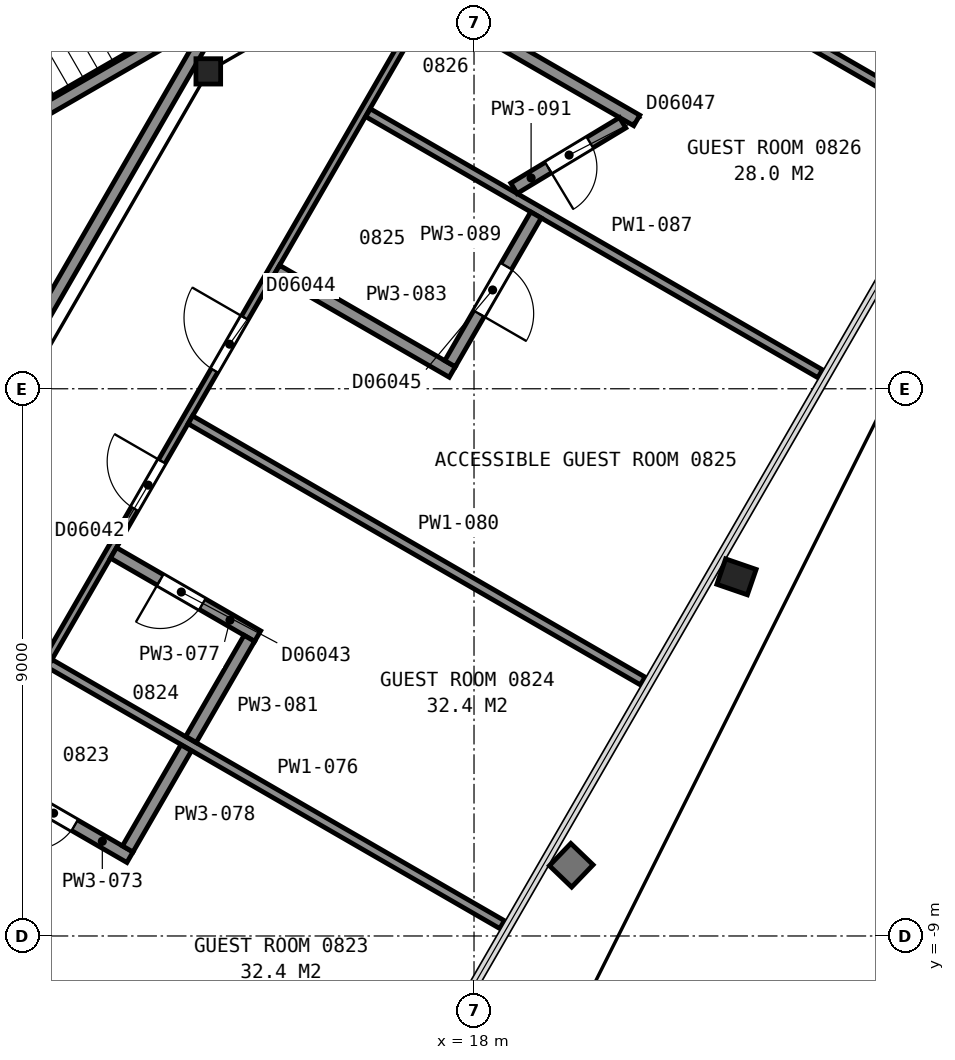
"""IFC4 building model, lengths in metres.
Left out: names, types, materials, properties, quantities, classifications, styles, units other than length and angle.
Written with IfcOpenShell. Run it as: python <this file> out.ifc"""

import sys

from ifc_helpers import new_model, si_unit, direction, frame, frame_2d, origin, origin_2d, place, context, subcontext, project, spatial, rectangle, i_section, extrude, element, fill, save


model = new_model("IFC4")
c1 = context("Model", 3, precision=1e-05, world=origin(), true_north=direction((0.0, 1.0)))
c2 = subcontext(c1, "Body", "Model", "MODEL_VIEW")
j1 = project(units=[si_unit("LENGTHUNIT", "METRE"), si_unit("PLANEANGLEUNIT", "RADIAN")], contexts=[c1])
p1 = place(None, origin())
s1 = spatial("IfcSite", under=j1, at=p1, CompositionType="ELEMENT")
p2 = place(p1, origin())
s2 = spatial("IfcBuilding", under=s1, at=p2, CompositionType="ELEMENT")
p3 = place(p2, frame((0.0, 0.0, 44.0)))
s3 = spatial("IfcBuildingStorey", under=s2, at=p3, CompositionType="ELEMENT", Elevation=44.0)
p4 = place(p3, frame((22.222, -3.061, 0.025), z_axis=(0.080308514275, -0.02761461711, 0.996387462515), x_axis=(-0.499182208178, -0.866345153128, 0.016223399441)))
e1 = element("IfcColumn", 1, at=p4, inside=s3, PredefinedType="COLUMN", context=c2, shape_type="SweptSolid", body=[
    extrude(i_section(OverallWidth=0.442, OverallDepth=0.531, WebThickness=0.066, FlangeThickness=0.106, FilletRadius=0.015, at=origin_2d()), origin(), (0.0, 0.0, 1.0), 3.563),
])
p5 = place(p3, frame((13.63, 5.22, 0.0), z_axis=(0.0, 0.0, 1.0), x_axis=(1.0, 0.0, 0.0)))
e2 = element("IfcColumn", 2, at=p5, inside=s3, PredefinedType="COLUMN", context=c2, shape_type="SweptSolid", body=[
    extrude(i_section(OverallWidth=0.406, OverallDepth=0.417, WebThickness=0.03, FlangeThickness=0.048, FilletRadius=0.015, at=origin_2d()), origin(), (0.0, 0.0, 1.0), 3.6),
])
for number, where, z_axis, x_axis in (
    (3, (6.178, 5.299, 0.0), (0.0, 0.0, 1.0), (0.866, 0.5, 0.0)),
    (4, (7.678, 2.701, 0.0), (0.0, 0.0, 1.0), (0.866, 0.5, 0.0)),
):
    element("IfcWall", number, at=place(p3, frame(where, z_axis=z_axis, x_axis=x_axis)), inside=s3, PredefinedType="PARTITIONING", context=c2, shape_type="SweptSolid", body=[
        extrude(rectangle(XDim=12.0, YDim=0.2, at=frame_2d((6.0, 0.0))), origin(), (0.0, 0.0, 1.0), 3.35),
    ])
p6 = place(p3, frame((8.492, -3.012, 0.0), z_axis=(0.0, 0.0, 1.0), x_axis=(0.499972957231, 0.866041016371, 0.0)))
e5 = element("IfcWall", 5, at=p6, inside=s3, PredefinedType="PARTITIONING", context=c2, shape_type="SweptSolid", body=[
    extrude(rectangle(XDim=10.349, YDim=0.2, at=frame_2d((5.174, 0.0))), origin(), (0.0, 0.0, 1.0), 3.35),
])
p7 = place(p3, frame((16.967, 5.906, 0.0), z_axis=(0.0, 0.0, 1.0), x_axis=(-0.500024758804, -0.866011108811, 0.0)))
e6 = element("IfcWall", 6, at=p7, inside=s3, PredefinedType="PARTITIONING", context=c2, shape_type="SweptSolid", body=[
    extrude(rectangle(XDim=26.402, YDim=0.125, at=frame_2d((13.201, 0.0))), origin(), (0.0, 0.0, 1.0), 2.613),
])
p8 = place(p7, frame((24.689, 0.0, 0.0)))
e7 = element("IfcOpeningElement", 7, at=p8, cuts=e6, PredefinedType="OPENING", context=c2, shape_type="SweptSolid", body=[
    extrude(rectangle(XDim=0.9, YDim=2.1, at=frame_2d((0.45, 1.05))), frame((0.0, 0.073, 0.0), z_axis=(0.0, -1.0, 0.0), x_axis=(1.0, 0.0, 0.0)), (0.0, 0.0, 1.0), 0.145),
])
p9 = place(p7, frame((17.709, 0.0, 0.0)))
e8 = element("IfcOpeningElement", 8, at=p9, cuts=e6, PredefinedType="OPENING", context=c2, shape_type="SweptSolid", body=[
    extrude(rectangle(XDim=0.9, YDim=2.1, at=frame_2d((0.45, 1.05))), frame((0.0, 0.073, 0.0), z_axis=(0.0, -1.0, 0.0), x_axis=(1.0, 0.0, 0.0)), (0.0, 0.0, 1.0), 0.145),
])
p10 = place(p7, frame((14.928, 0.0, 0.0)))
e9 = element("IfcOpeningElement", 9, at=p10, cuts=e6, PredefinedType="OPENING", context=c2, shape_type="SweptSolid", body=[
    extrude(rectangle(XDim=0.9, YDim=2.1, at=frame_2d((0.45, 1.05))), frame((0.0, 0.073, 0.0), z_axis=(0.0, -1.0, 0.0), x_axis=(1.0, 0.0, 0.0)), (0.0, 0.0, 1.0), 0.145),
])
p11 = place(p7, frame((8.2, 0.0, 0.0)))
e10 = element("IfcOpeningElement", 10, at=p11, cuts=e6, PredefinedType="OPENING", context=c2, shape_type="SweptSolid", body=[
    extrude(rectangle(XDim=0.9, YDim=2.1, at=frame_2d((0.45, 1.05))), frame((0.0, 0.073, 0.0), z_axis=(0.0, -1.0, 0.0), x_axis=(1.0, 0.0, 0.0)), (0.0, 0.0, 1.0), 0.145),
])
p12 = place(p7, frame((5.473, 0.0, 0.0)))
e11 = element("IfcOpeningElement", 11, at=p12, cuts=e6, PredefinedType="OPENING", context=c2, shape_type="SweptSolid", body=[
    extrude(rectangle(XDim=1.0, YDim=2.1, at=frame_2d((0.5, 1.05))), frame((0.0, 0.073, 0.0), z_axis=(0.0, -1.0, 0.0), x_axis=(1.0, 0.0, 0.0)), (0.0, 0.0, 1.0), 0.145),
])
p13 = place(p3, frame((8.707, -8.525, 0.0), z_axis=(0.0, 0.0, 1.0), x_axis=(0.866036528751, -0.499980730498, 0.0)))
e12 = element("IfcWall", 12, at=p13, inside=s3, PredefinedType="PARTITIONING", context=c2, shape_type="SweptSolid", body=[
    extrude(rectangle(XDim=8.592, YDim=0.15, at=frame_2d((4.296, 0.0))), origin(), (0.0, 0.0, 1.0), 2.613),
])
p14 = place(p3, frame((9.971, -6.336, 0.0), z_axis=(0.0, 0.0, 1.0), x_axis=(0.86596722502, -0.50010075504, 0.0)))
e13 = element("IfcWall", 13, at=p14, inside=s3, PredefinedType="PARTITIONING", context=c2, shape_type="SweptSolid", body=[
    extrude(rectangle(XDim=2.737, YDim=0.2, at=frame_2d((1.369, 0.0))), origin(), (0.0, 0.0, 1.0), 2.613),
])
p15 = place(p14, frame((0.887, 0.0, 0.0)))
e14 = element("IfcOpeningElement", 14, at=p15, cuts=e13, PredefinedType="OPENING", context=c2, shape_type="SweptSolid", body=[
    extrude(rectangle(XDim=0.8, YDim=2.1, at=frame_2d((0.4, 1.05))), frame((0.0, 0.11, 0.0), z_axis=(0.0, -1.0, 0.0), x_axis=(1.0, 0.0, 0.0)), (0.0, 0.0, 1.0), 0.22),
])
p16 = place(p3, frame((11.021, -4.517, 0.0), z_axis=(0.0, 0.0, 1.0), x_axis=(0.866029425019, -0.499993034952, 0.0)))
e15 = element("IfcWall", 15, at=p16, inside=s3, PredefinedType="PARTITIONING", context=c2, shape_type="SweptSolid", body=[
    extrude(rectangle(XDim=8.591, YDim=0.15, at=frame_2d((4.296, 0.0))), origin(), (0.0, 0.0, 1.0), 2.613),
])
p17 = place(p3, frame((14.442, -4.068, 0.0), z_axis=(0.0, 0.0, 1.0), x_axis=(-0.865989529477, 0.500062130976, 0.0)))
e16 = element("IfcWall", 16, at=p17, inside=s3, PredefinedType="PARTITIONING", context=c2, shape_type="SweptSolid", body=[
    extrude(rectangle(XDim=2.738, YDim=0.2, at=frame_2d((1.369, 0.0))), origin(), (0.0, 0.0, 1.0), 2.613),
])
p18 = place(p17, frame((1.05, 0.0, 0.0)))
e17 = element("IfcOpeningElement", 17, at=p18, cuts=e16, PredefinedType="OPENING", context=c2, shape_type="SweptSolid", body=[
    extrude(rectangle(XDim=0.8, YDim=2.1, at=frame_2d((0.4, 1.05))), frame((0.0, 0.11, 0.0), z_axis=(0.0, -1.0, 0.0), x_axis=(1.0, 0.0, 0.0)), (0.0, 0.0, 1.0), 0.22),
])
p19 = place(p3, frame((12.305, -7.568, 0.0), z_axis=(0.0, 0.0, 1.0), x_axis=(0.500269123289, 0.865869969617, 0.0)))
e18 = element("IfcWall", 18, at=p19, inside=s3, PredefinedType="PARTITIONING", context=c2, shape_type="SweptSolid", body=[
    extrude(rectangle(XDim=1.92, YDim=0.2, at=frame_2d((0.96, 0.0))), origin(), (0.0, 0.0, 1.0), 2.613),
])
p20 = place(p3, frame((13.335, -0.51, 0.0), z_axis=(0.0, 0.0, 1.0), x_axis=(0.865995804368, -0.50005126419, 0.0)))
e19 = element("IfcWall", 19, at=p20, inside=s3, PredefinedType="PARTITIONING", context=c2, shape_type="SweptSolid", body=[
    extrude(rectangle(XDim=8.591, YDim=0.15, at=frame_2d((4.295, 0.0))), origin(), (0.0, 0.0, 1.0), 2.613),
])
p21 = place(p3, frame((13.345, -5.767, 0.0), z_axis=(0.0, 0.0, 1.0), x_axis=(0.499832553123, 0.866122057702, 0.0)))
e20 = element("IfcWall", 20, at=p21, inside=s3, PredefinedType="PARTITIONING", context=c2, shape_type="SweptSolid", body=[
    extrude(rectangle(XDim=1.92, YDim=0.2, at=frame_2d((0.96, 0.0))), origin(), (0.0, 0.0, 1.0), 2.613),
])
p22 = place(p3, frame((14.752, 1.945, 0.0), z_axis=(0.0, 0.0, 1.0), x_axis=(0.866033317326, -0.499986293093, 0.0)))
e21 = element("IfcWall", 21, at=p22, inside=s3, PredefinedType="PARTITIONING", context=c2, shape_type="SweptSolid", body=[
    extrude(rectangle(XDim=3.337, YDim=0.2, at=frame_2d((1.669, 0.0))), origin(), (0.0, 0.0, 1.0), 2.613),
])
p23 = place(p3, frame((16.256, 4.54, 0.0), z_axis=(0.0, 0.0, 1.0), x_axis=(0.866031705461, -0.499989085017, 0.0)))
e22 = element("IfcWall", 22, at=p23, inside=s3, PredefinedType="PARTITIONING", context=c2, shape_type="SweptSolid", body=[
    extrude(rectangle(XDim=8.587, YDim=0.15, at=frame_2d((4.293, 0.0))), origin(), (0.0, 0.0, 1.0), 2.613),
])
p24 = place(p3, frame((17.606, 0.413, 0.0), z_axis=(0.0, 0.0, 1.0), x_axis=(0.500024172624, 0.866011447264, 0.0)))
e23 = element("IfcWall", 23, at=p24, inside=s3, PredefinedType="PARTITIONING", context=c2, shape_type="SweptSolid", body=[
    extrude(rectangle(XDim=2.825, YDim=0.2, at=frame_2d((1.413, 0.0))), origin(), (0.0, 0.0, 1.0), 2.613),
])
p25 = place(p24, frame((0.95, 0.0, 0.0)))
e24 = element("IfcOpeningElement", 24, at=p25, cuts=e23, PredefinedType="OPENING", context=c2, shape_type="SweptSolid", body=[
    extrude(rectangle(XDim=0.9, YDim=2.1, at=frame_2d((0.45, 1.05))), frame((0.0, 0.11, 0.0), z_axis=(0.0, -1.0, 0.0), x_axis=(1.0, 0.0, 0.0)), (0.0, 0.0, 1.0), 0.22),
])
p26 = place(p3, frame((17.673, 6.147, 0.0), z_axis=(0.0, 0.0, 1.0), x_axis=(0.866077754448, -0.499909315027, 0.0)))
e25 = element("IfcWall", 25, at=p26, inside=s3, PredefinedType="PARTITIONING", context=c2, shape_type="SweptSolid", body=[
    extrude(rectangle(XDim=3.469, YDim=0.2, at=frame_2d((1.734, 0.0))), origin(), (0.0, 0.0, 1.0), 2.613),
])
p27 = place(p3, frame((18.657, 3.297, 0.0), z_axis=(0.0, 0.0, 1.0), x_axis=(0.856262573572, 0.51654080681, 0.0)))
e26 = element("IfcWall", 26, at=p27, inside=s3, PredefinedType="PARTITIONING", context=c2, shape_type="SweptSolid", body=[
    extrude(rectangle(XDim=2.088, YDim=0.2, at=frame_2d((1.044, 0.0))), origin(), (0.0, 0.0, 1.0), 2.613),
])
p28 = place(p27, frame((0.659, 0.0, 0.0)))
e27 = element("IfcOpeningElement", 27, at=p28, cuts=e26, PredefinedType="OPENING", context=c2, shape_type="SweptSolid", body=[
    extrude(rectangle(XDim=0.8, YDim=2.1, at=frame_2d((0.4, 1.05))), frame((0.0, 0.11, 0.0), z_axis=(0.0, -1.0, 0.0), x_axis=(1.0, 0.0, 0.0)), (0.0, 0.0, 1.0), 0.22),
])
p29 = place(p3, frame((21.189, 7.036, 0.0), z_axis=(0.0, 0.0, 1.0), x_axis=(0.865981654797, -0.500075767815, 0.0)))
e28 = element("IfcWall", 28, at=p29, inside=s3, PredefinedType="PARTITIONING", context=c2, shape_type="SweptSolid", body=[
    extrude(rectangle(XDim=5.563, YDim=0.15, at=frame_2d((2.781, 0.0))), origin(), (0.0, 0.0, 1.0), 2.613),
])
p30 = place(p11, origin())
e29 = element("IfcDoor", 29, at=p30, inside=s3, OperationType="SINGLE_SWING_LEFT", PredefinedType="DOOR", context=c2, shape_type="SweptSolid", body=[
    extrude(rectangle(XDim=0.9, YDim=2.1, at=frame_2d((0.45, 1.05))), frame((0.0, 0.025, 0.0), z_axis=(0.0, -1.0, 0.0), x_axis=(1.0, 0.0, 0.0)), (0.0, 0.0, 1.0), 0.05),
])
fill(e10, e29)
p31 = place(p12, origin())
e30 = element("IfcDoor", 30, at=p31, inside=s3, OperationType="SINGLE_SWING_LEFT", PredefinedType="DOOR", context=c2, shape_type="SweptSolid", body=[
    extrude(rectangle(XDim=1.0, YDim=2.1, at=frame_2d((0.5, 1.05))), frame((0.0, 0.025, 0.0), z_axis=(0.0, -1.0, 0.0), x_axis=(1.0, 0.0, 0.0)), (0.0, 0.0, 1.0), 0.05),
])
fill(e11, e30)
p32 = place(p15, origin())
e31 = element("IfcDoor", 31, at=p32, inside=s3, OperationType="SINGLE_SWING_LEFT", PredefinedType="DOOR", context=c2, shape_type="SweptSolid", body=[
    extrude(rectangle(XDim=0.8, YDim=2.1, at=frame_2d((0.4, 1.05))), frame((0.0, 0.025, 0.0), z_axis=(0.0, -1.0, 0.0), x_axis=(1.0, 0.0, 0.0)), (0.0, 0.0, 1.0), 0.05),
])
fill(e14, e31)
p33 = place(p18, origin())
e32 = element("IfcDoor", 32, at=p33, inside=s3, OperationType="SINGLE_SWING_RIGHT", PredefinedType="DOOR", context=c2, shape_type="SweptSolid", body=[
    extrude(rectangle(XDim=0.8, YDim=2.1, at=frame_2d((0.4, 1.05))), frame((0.0, 0.025, 0.0), z_axis=(0.0, -1.0, 0.0), x_axis=(1.0, 0.0, 0.0)), (0.0, 0.0, 1.0), 0.05),
])
fill(e17, e32)
p34 = place(p25, origin())
e33 = element("IfcDoor", 33, at=p34, inside=s3, OperationType="SINGLE_SWING_LEFT", PredefinedType="DOOR", context=c2, shape_type="SweptSolid", body=[
    extrude(rectangle(XDim=0.9, YDim=2.1, at=frame_2d((0.45, 1.05))), frame((0.0, 0.025, 0.0), z_axis=(0.0, -1.0, 0.0), x_axis=(1.0, 0.0, 0.0)), (0.0, 0.0, 1.0), 0.05),
])
fill(e24, e33)
p35 = place(p28, origin())
e34 = element("IfcDoor", 34, at=p35, inside=s3, OperationType="SINGLE_SWING_LEFT", PredefinedType="DOOR", context=c2, shape_type="SweptSolid", body=[
    extrude(rectangle(XDim=0.8, YDim=2.1, at=frame_2d((0.4, 1.05))), frame((0.0, 0.025, 0.0), z_axis=(0.0, -1.0, 0.0), x_axis=(1.0, 0.0, 0.0)), (0.0, 0.0, 1.0), 0.05),
])
fill(e27, e34)
save(model, sys.argv[1])
